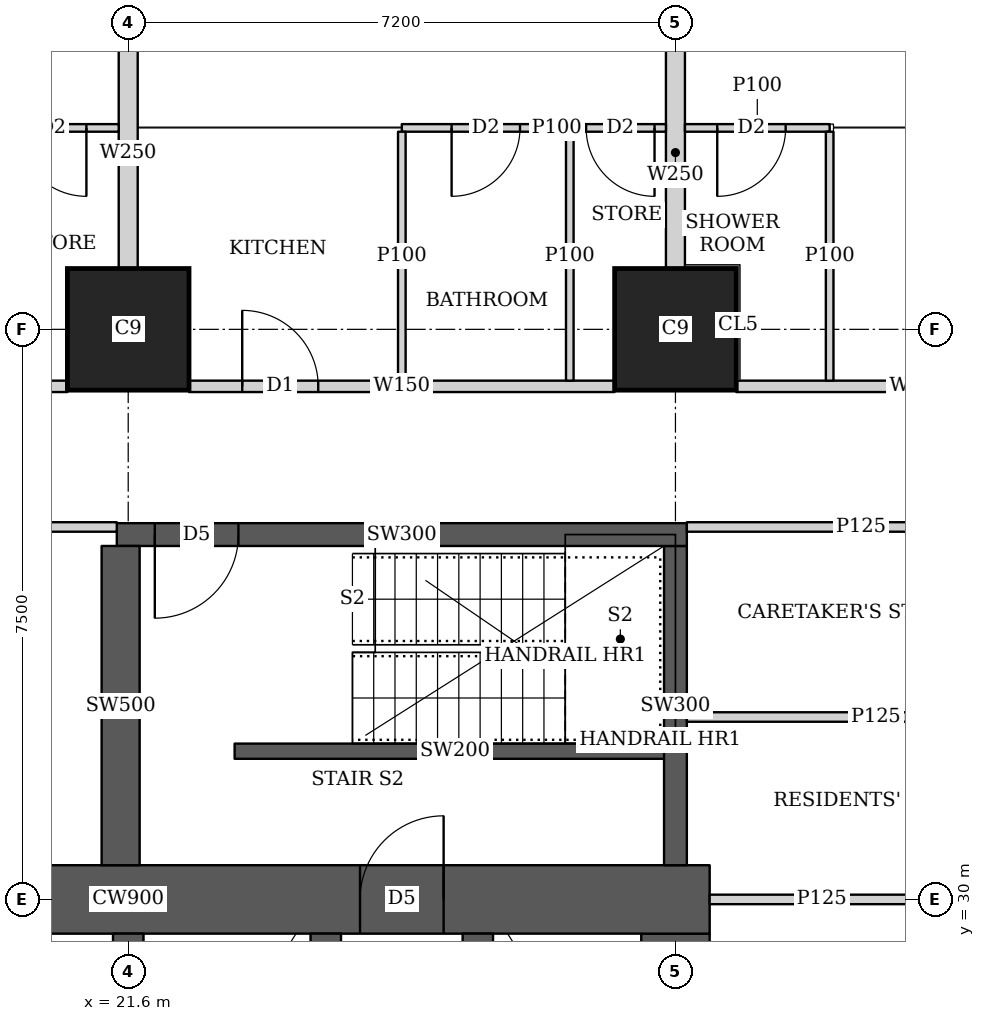
"""IFC4 building model, lengths in metres.
Left out: names, types, materials, properties, quantities, classifications, styles, units other than length and angle.
Written with IfcOpenShell. Run it as: python <this file> out.ifc"""

import sys

from ifc_helpers import new_model, si_unit, direction, frame, frame_2d, origin, origin_2d, place, context, subcontext, project, spatial, rectangle, extrude, element, fill, save


model = new_model("IFC4")
c1 = context("Model", 3, precision=1e-05, world=origin(), true_north=direction((0.0, 1.0)))
c2 = subcontext(c1, "Body", "Model", "MODEL_VIEW")
j1 = project(units=[si_unit("LENGTHUNIT", "METRE"), si_unit("PLANEANGLEUNIT", "RADIAN")], contexts=[c1])
p1 = place(None, origin())
s1 = spatial("IfcSite", under=j1, at=p1, CompositionType="ELEMENT")
p2 = place(p1, origin())
s2 = spatial("IfcBuilding", under=s1, at=p2, CompositionType="ELEMENT")
p3 = place(p2, frame((0.0, 0.0, 126.65)))
s3 = spatial("IfcBuildingStorey", under=s2, at=p3, CompositionType="ELEMENT", Elevation=126.65)
for number, where, z_axis, x_axis in (
    (1, (21.6, 37.5, 0.0), (0.0, 0.0, 1.0), (1.0, 0.0, 0.0)),
    (2, (28.8, 37.5, 0.0), (0.0, 0.0, 1.0), (1.0, 0.0, 0.0)),
):
    element("IfcColumn", number, at=place(p3, frame(where, z_axis=z_axis, x_axis=x_axis)), inside=s3, PredefinedType="COLUMN", context=c2, shape_type="SweptSolid", body=[
        extrude(rectangle(XDim=1.6, YDim=1.6, at=origin_2d()), origin(), (0.0, 0.0, 1.0), 3.75),
    ])
p4 = place(p3, frame((13.95, 30.0, 0.0), z_axis=(0.0, 0.0, 1.0), x_axis=(1.0, 0.0, 0.0)))
e3 = element("IfcWall", 3, at=p4, inside=s3, PredefinedType="SHEAR", context=c2, shape_type="SweptSolid", body=[
    extrude(rectangle(XDim=15.3, YDim=0.9, at=frame_2d((7.65, 0.0))), origin(), (0.0, 0.0, 1.0), 3.75),
])
p5 = place(p4, frame((4.45, 0.0, 0.0)))
e4 = element("IfcOpeningElement", 4, at=p5, cuts=e3, PredefinedType="OPENING", context=c2, shape_type="SweptSolid", body=[
    extrude(rectangle(XDim=1.8, YDim=2.1, at=frame_2d((0.9, 1.05))), frame((0.0, 0.46, 0.0), z_axis=(0.0, -1.0, 0.0), x_axis=(1.0, 0.0, 0.0)), (0.0, 0.0, 1.0), 0.92),
])
p6 = place(p4, frame((10.7, 0.0, 0.0)))
e5 = element("IfcOpeningElement", 5, at=p6, cuts=e3, PredefinedType="OPENING", context=c2, shape_type="SweptSolid", body=[
    extrude(rectangle(XDim=1.1, YDim=2.1, at=frame_2d((0.55, 1.05))), frame((0.0, 0.46, 0.0), z_axis=(0.0, -1.0, 0.0), x_axis=(1.0, 0.0, 0.0)), (0.0, 0.0, 1.0), 0.92),
])
p7 = place(p3, frame((28.8, 15.45, 0.0), z_axis=(0.0, 0.0, 1.0), x_axis=(0.0, 1.0, 0.0)))
e6 = element("IfcWall", 6, at=p7, inside=s3, PredefinedType="SHEAR", context=c2, shape_type="SweptSolid", body=[
    extrude(rectangle(XDim=14.1, YDim=0.9, at=frame_2d((7.05, 0.0))), origin(), (0.0, 0.0, 1.0), 3.75),
])
for number, where, z_axis, x_axis in (
    (7, (21.6, 15.45, 0.0), (0.0, 0.0, 1.0), (0.0, 1.0, 0.0)),
    (8, (24.2, 15.45, 0.0), (0.0, 0.0, 1.0), (0.0, 1.0, 0.0)),
):
    element("IfcWall", number, at=place(p3, frame(where, z_axis=z_axis, x_axis=x_axis)), inside=s3, PredefinedType="SHEAR", context=c2, shape_type="SweptSolid", body=[
        extrude(rectangle(XDim=14.1, YDim=0.4, at=frame_2d((7.05, 0.0))), origin(), (0.0, 0.0, 1.0), 3.75),
    ])
p8 = place(p3, frame((26.2, 26.45, 0.0), z_axis=(0.0, 0.0, 1.0), x_axis=(0.0, 1.0, 0.0)))
e9 = element("IfcWall", 9, at=p8, inside=s3, PredefinedType="SHEAR", context=c2, shape_type="SweptSolid", body=[
    extrude(rectangle(XDim=3.1, YDim=0.4, at=frame_2d((1.55, 0.0))), origin(), (0.0, 0.0, 1.0), 3.75),
])
p9 = place(p8, frame((1.075, 0.0, 0.0)))
e10 = element("IfcOpeningElement", 10, at=p9, cuts=e9, PredefinedType="OPENING", context=c2, shape_type="SweptSolid", body=[
    extrude(rectangle(XDim=1.2, YDim=2.1, at=frame_2d((0.6, 1.05))), frame((0.0, 0.21, 0.0), z_axis=(0.0, -1.0, 0.0), x_axis=(1.0, 0.0, 0.0)), (0.0, 0.0, 1.0), 0.42),
])
p10 = place(p3, frame((21.45, 34.8, 0.0), z_axis=(0.0, 0.0, 1.0), x_axis=(1.0, 0.0, 0.0)))
e11 = element("IfcWall", 11, at=p10, inside=s3, PredefinedType="SHEAR", context=c2, shape_type="SweptSolid", body=[
    extrude(rectangle(XDim=7.5, YDim=0.3, at=frame_2d((3.75, 0.0))), origin(), (0.0, 0.0, 1.0), 3.75),
])
p11 = place(p10, frame((0.5, 0.0, 0.0)))
e12 = element("IfcOpeningElement", 12, at=p11, cuts=e11, PredefinedType="OPENING", context=c2, shape_type="SweptSolid", body=[
    extrude(rectangle(XDim=1.1, YDim=2.1, at=frame_2d((0.55, 1.05))), frame((0.0, 0.16, 0.0), z_axis=(0.0, -1.0, 0.0), x_axis=(1.0, 0.0, 0.0)), (0.0, 0.0, 1.0), 0.32),
])
p12 = place(p3, frame((21.5, 30.45, 0.0), z_axis=(0.0, 0.0, 1.0), x_axis=(0.0, 1.0, 0.0)))
e13 = element("IfcWall", 13, at=p12, inside=s3, PredefinedType="SHEAR", context=c2, shape_type="SweptSolid", body=[
    extrude(rectangle(XDim=4.2, YDim=0.5, at=frame_2d((2.1, 0.0))), origin(), (0.0, 0.0, 1.0), 3.75),
])
p13 = place(p3, frame((28.8, 30.45, 0.0), z_axis=(0.0, 0.0, 1.0), x_axis=(0.0, 1.0, 0.0)))
e14 = element("IfcWall", 14, at=p13, inside=s3, PredefinedType="SHEAR", context=c2, shape_type="SweptSolid", body=[
    extrude(rectangle(XDim=4.2, YDim=0.3, at=frame_2d((2.1, 0.0))), origin(), (0.0, 0.0, 1.0), 3.75),
])
p14 = place(p3, frame((15.201, 36.75, 0.0), z_axis=(0.0, 0.0, 1.0), x_axis=(1.0, 0.0, 0.0)))
e15 = element("IfcWall", 15, at=p14, inside=s3, PredefinedType="SOLIDWALL", context=c2, shape_type="SweptSolid", body=[
    extrude(rectangle(XDim=5.598, YDim=0.15, at=frame_2d((2.799, 0.0))), origin(), (0.0, 0.0, 1.0), 3.45),
])
p15 = place(p3, frame((22.401, 36.75, 0.0), z_axis=(0.0, 0.0, 1.0), x_axis=(1.0, 0.0, 0.0)))
e16 = element("IfcWall", 16, at=p15, inside=s3, PredefinedType="SOLIDWALL", context=c2, shape_type="SweptSolid", body=[
    extrude(rectangle(XDim=5.598, YDim=0.15, at=frame_2d((2.799, 0.0))), origin(), (0.0, 0.0, 1.0), 3.45),
])
p16 = place(p15, frame((0.699, 0.0, 0.0)))
e17 = element("IfcOpeningElement", 17, at=p16, cuts=e16, PredefinedType="OPENING", context=c2, shape_type="SweptSolid", body=[
    extrude(rectangle(XDim=1.0, YDim=2.1, at=frame_2d((0.5, 1.05))), frame((0.0, 0.085, 0.0), z_axis=(0.0, -1.0, 0.0), x_axis=(1.0, 0.0, 0.0)), (0.0, 0.0, 1.0), 0.17),
])
p17 = place(p3, frame((29.601, 36.75, 0.0), z_axis=(0.0, 0.0, 1.0), x_axis=(1.0, 0.0, 0.0)))
e18 = element("IfcWall", 18, at=p17, inside=s3, PredefinedType="SOLIDWALL", context=c2, shape_type="SweptSolid", body=[
    extrude(rectangle(XDim=5.372, YDim=0.15, at=frame_2d((2.686, 0.0))), origin(), (0.0, 0.0, 1.0), 3.45),
])
p18 = place(p17, frame((2.845, 0.0, 0.0)))
e19 = element("IfcOpeningElement", 19, at=p18, cuts=e18, PredefinedType="OPENING", context=c2, shape_type="SweptSolid", body=[
    extrude(rectangle(XDim=1.0, YDim=2.1, at=frame_2d((0.5, 1.05))), frame((0.0, 0.085, 0.0), z_axis=(0.0, -1.0, 0.0), x_axis=(1.0, 0.0, 0.0)), (0.0, 0.0, 1.0), 0.17),
])
p19 = place(p3, frame((14.4, 40.15, 0.0), z_axis=(0.0, 0.0, 1.0), x_axis=(1.0, 0.0, 0.0)))
e20 = element("IfcWall", 20, at=p19, inside=s3, PredefinedType="PARTITIONING", context=c2, shape_type="SweptSolid", body=[
    extrude(rectangle(XDim=7.075, YDim=0.1, at=frame_2d((3.538, 0.0))), origin(), (0.0, 0.0, 1.0), 3.45),
])
p20 = place(p19, frame((0.655, 0.0, 0.0)))
e21 = element("IfcOpeningElement", 21, at=p20, cuts=e20, PredefinedType="OPENING", context=c2, shape_type="SweptSolid", body=[
    extrude(rectangle(XDim=0.9, YDim=2.1, at=frame_2d((0.45, 1.05))), frame((0.0, 0.06, 0.0), z_axis=(0.0, -1.0, 0.0), x_axis=(1.0, 0.0, 0.0)), (0.0, 0.0, 1.0), 0.12),
])
p21 = place(p19, frame((3.95, 0.0, 0.0)))
e22 = element("IfcOpeningElement", 22, at=p21, cuts=e20, PredefinedType="OPENING", context=c2, shape_type="SweptSolid", body=[
    extrude(rectangle(XDim=0.9, YDim=2.1, at=frame_2d((0.45, 1.05))), frame((0.0, 0.06, 0.0), z_axis=(0.0, -1.0, 0.0), x_axis=(1.0, 0.0, 0.0)), (0.0, 0.0, 1.0), 0.12),
])
p22 = place(p19, frame((2.455, 0.0, 0.0)))
e23 = element("IfcOpeningElement", 23, at=p22, cuts=e20, PredefinedType="OPENING", context=c2, shape_type="SweptSolid", body=[
    extrude(rectangle(XDim=0.9, YDim=2.1, at=frame_2d((0.45, 1.05))), frame((0.0, 0.06, 0.0), z_axis=(0.0, -1.0, 0.0), x_axis=(1.0, 0.0, 0.0)), (0.0, 0.0, 1.0), 0.12),
])
p23 = place(p19, frame((5.75, 0.0, 0.0)))
e24 = element("IfcOpeningElement", 24, at=p23, cuts=e20, PredefinedType="OPENING", context=c2, shape_type="SweptSolid", body=[
    extrude(rectangle(XDim=0.9, YDim=2.1, at=frame_2d((0.45, 1.05))), frame((0.0, 0.06, 0.0), z_axis=(0.0, -1.0, 0.0), x_axis=(1.0, 0.0, 0.0)), (0.0, 0.0, 1.0), 0.12),
])
p24 = place(p3, frame((25.2, 40.15, 0.0), z_axis=(0.0, 0.0, 1.0), x_axis=(1.0, 0.0, 0.0)))
e25 = element("IfcWall", 25, at=p24, inside=s3, PredefinedType="PARTITIONING", context=c2, shape_type="SweptSolid", body=[
    extrude(rectangle(XDim=3.475, YDim=0.1, at=frame_2d((1.738, 0.0))), origin(), (0.0, 0.0, 1.0), 3.45),
])
p25 = place(p24, frame((0.655, 0.0, 0.0)))
e26 = element("IfcOpeningElement", 26, at=p25, cuts=e25, PredefinedType="OPENING", context=c2, shape_type="SweptSolid", body=[
    extrude(rectangle(XDim=0.9, YDim=2.1, at=frame_2d((0.45, 1.05))), frame((0.0, 0.06, 0.0), z_axis=(0.0, -1.0, 0.0), x_axis=(1.0, 0.0, 0.0)), (0.0, 0.0, 1.0), 0.12),
])
p26 = place(p24, frame((2.425, 0.0, 0.0)))
e27 = element("IfcOpeningElement", 27, at=p26, cuts=e25, PredefinedType="OPENING", context=c2, shape_type="SweptSolid", body=[
    extrude(rectangle(XDim=0.9, YDim=2.1, at=frame_2d((0.45, 1.05))), frame((0.0, 0.06, 0.0), z_axis=(0.0, -1.0, 0.0), x_axis=(1.0, 0.0, 0.0)), (0.0, 0.0, 1.0), 0.12),
])
for number, where, z_axis, x_axis in (
    (28, (25.2, 36.825, 0.0), (0.0, 0.0, 1.0), (0.0, 1.0, 0.0)),
    (29, (27.41, 36.825, 0.0), (0.0, 0.0, 1.0), (0.0, 1.0, 0.0)),
):
    element("IfcWall", number, at=place(p3, frame(where, z_axis=z_axis, x_axis=x_axis)), inside=s3, PredefinedType="PARTITIONING", context=c2, shape_type="SweptSolid", body=[
        extrude(rectangle(XDim=3.275, YDim=0.1, at=frame_2d((1.638, 0.0))), origin(), (0.0, 0.0, 1.0), 3.45),
    ])
p27 = place(p3, frame((21.6, 38.301, 0.0), z_axis=(0.0, 0.0, 1.0), x_axis=(0.0, 1.0, 0.0)))
e30 = element("IfcWall", 30, at=p27, inside=s3, PredefinedType="SOLIDWALL", context=c2, shape_type="SweptSolid", body=[
    extrude(rectangle(XDim=3.049, YDim=0.25, at=frame_2d((1.524, 0.0))), origin(), (0.0, 0.0, 1.0), 3.45),
])
p28 = place(p3, frame((28.925, 40.15, 0.0), z_axis=(0.0, 0.0, 1.0), x_axis=(1.0, 0.0, 0.0)))
e31 = element("IfcWall", 31, at=p28, inside=s3, PredefinedType="PARTITIONING", context=c2, shape_type="SweptSolid", body=[
    extrude(rectangle(XDim=1.904, YDim=0.1, at=frame_2d((0.952, 0.0))), origin(), (0.0, 0.0, 1.0), 3.45),
])
p29 = place(p28, frame((0.425, 0.0, 0.0)))
e32 = element("IfcOpeningElement", 32, at=p29, cuts=e31, PredefinedType="OPENING", context=c2, shape_type="SweptSolid", body=[
    extrude(rectangle(XDim=0.9, YDim=2.1, at=frame_2d((0.45, 1.05))), frame((0.0, 0.06, 0.0), z_axis=(0.0, -1.0, 0.0), x_axis=(1.0, 0.0, 0.0)), (0.0, 0.0, 1.0), 0.12),
])
p30 = place(p3, frame((30.829, 36.825, 0.0), z_axis=(0.0, 0.0, 1.0), x_axis=(0.0, 1.0, 0.0)))
e33 = element("IfcWall", 33, at=p30, inside=s3, PredefinedType="PARTITIONING", context=c2, shape_type="SweptSolid", body=[
    extrude(rectangle(XDim=3.275, YDim=0.1, at=frame_2d((1.638, 0.0))), origin(), (0.0, 0.0, 1.0), 3.45),
])
p31 = place(p3, frame((28.8, 38.301, 0.0), z_axis=(0.0, 0.0, 1.0), x_axis=(0.0, 1.0, 0.0)))
e34 = element("IfcWall", 34, at=p31, inside=s3, PredefinedType="SOLIDWALL", context=c2, shape_type="SweptSolid", body=[
    extrude(rectangle(XDim=3.049, YDim=0.25, at=frame_2d((1.524, 0.0))), origin(), (0.0, 0.0, 1.0), 3.45),
])
p32 = place(p3, frame((10.163, 34.9, 0.0), z_axis=(0.0, 0.0, 1.0), x_axis=(1.0, 0.0, 0.0)))
e35 = element("IfcWall", 35, at=p32, inside=s3, PredefinedType="PARTITIONING", context=c2, shape_type="SweptSolid", body=[
    extrude(rectangle(XDim=11.287, YDim=0.125, at=frame_2d((5.644, 0.0))), origin(), (0.0, 0.0, 1.0), 3.45),
])
p33 = place(p32, frame((7.737, 0.0, 0.0)))
e36 = element("IfcOpeningElement", 36, at=p33, cuts=e35, PredefinedType="OPENING", context=c2, shape_type="SweptSolid", body=[
    extrude(rectangle(XDim=1.8, YDim=2.1, at=frame_2d((0.9, 1.05))), frame((0.0, 0.073, 0.0), z_axis=(0.0, -1.0, 0.0), x_axis=(1.0, 0.0, 0.0)), (0.0, 0.0, 1.0), 0.145),
])
p34 = place(p3, frame((28.95, 34.9, 0.0), z_axis=(0.0, 0.0, 1.0), x_axis=(1.0, 0.0, 0.0)))
e37 = element("IfcWall", 37, at=p34, inside=s3, PredefinedType="PARTITIONING", context=c2, shape_type="SweptSolid", body=[
    extrude(rectangle(XDim=4.588, YDim=0.125, at=frame_2d((2.294, 0.0))), origin(), (0.0, 0.0, 1.0), 3.45),
])
p35 = place(p3, frame((29.25, 30.0, 0.0), z_axis=(0.0, 0.0, 1.0), x_axis=(1.0, 0.0, 0.0)))
e38 = element("IfcWall", 38, at=p35, inside=s3, PredefinedType="PARTITIONING", context=c2, shape_type="SweptSolid", body=[
    extrude(rectangle(XDim=2.949, YDim=0.125, at=frame_2d((1.475, 0.0))), origin(), (0.0, 0.0, 1.0), 3.45),
])
p36 = place(p3, frame((28.95, 32.4, 0.0), z_axis=(0.0, 0.0, 1.0), x_axis=(1.0, 0.0, 0.0)))
e39 = element("IfcWall", 39, at=p36, inside=s3, PredefinedType="PARTITIONING", context=c2, shape_type="SweptSolid", body=[
    extrude(rectangle(XDim=4.976, YDim=0.125, at=frame_2d((2.488, 0.0))), origin(), (0.0, 0.0, 1.0), 3.45),
])
p37 = place(p3, frame((23.0, 31.95, 0.0), z_axis=(0.0, 0.0, 1.0), x_axis=(1.0, 0.0, 0.0)))
e40 = element("IfcWall", 40, at=p37, inside=s3, PredefinedType="SHEAR", context=c2, shape_type="SweptSolid", body=[
    extrude(rectangle(XDim=5.8, YDim=0.2, at=frame_2d((2.9, 0.0))), origin(), (0.0, 0.0, 1.0), 3.75),
])
p38 = place(p23, origin())
e41 = element("IfcDoor", 41, at=p38, inside=s3, OperationType="SINGLE_SWING_LEFT", PredefinedType="DOOR", context=c2, shape_type="SweptSolid", body=[
    extrude(rectangle(XDim=0.9, YDim=2.1, at=frame_2d((0.45, 1.05))), frame((0.0, 0.025, 0.0), z_axis=(0.0, -1.0, 0.0), x_axis=(1.0, 0.0, 0.0)), (0.0, 0.0, 1.0), 0.05),
])
fill(e24, e41)
p39 = place(p25, origin())
e42 = element("IfcDoor", 42, at=p39, inside=s3, OperationType="SINGLE_SWING_RIGHT", PredefinedType="DOOR", context=c2, shape_type="SweptSolid", body=[
    extrude(rectangle(XDim=0.9, YDim=2.1, at=frame_2d((0.45, 1.05))), frame((0.0, 0.025, 0.0), z_axis=(0.0, -1.0, 0.0), x_axis=(1.0, 0.0, 0.0)), (0.0, 0.0, 1.0), 0.05),
])
fill(e26, e42)
p40 = place(p26, origin())
e43 = element("IfcDoor", 43, at=p40, inside=s3, OperationType="SINGLE_SWING_LEFT", PredefinedType="DOOR", context=c2, shape_type="SweptSolid", body=[
    extrude(rectangle(XDim=0.9, YDim=2.1, at=frame_2d((0.45, 1.05))), frame((0.0, 0.025, 0.0), z_axis=(0.0, -1.0, 0.0), x_axis=(1.0, 0.0, 0.0)), (0.0, 0.0, 1.0), 0.05),
])
fill(e27, e43)
p41 = place(p16, origin())
e44 = element("IfcDoor", 44, at=p41, inside=s3, OperationType="SINGLE_SWING_LEFT", PredefinedType="DOOR", context=c2, shape_type="SweptSolid", body=[
    extrude(rectangle(XDim=1.0, YDim=2.1, at=frame_2d((0.5, 1.05))), frame((0.0, 0.025, 0.0), z_axis=(0.0, -1.0, 0.0), x_axis=(1.0, 0.0, 0.0)), (0.0, 0.0, 1.0), 0.05),
])
fill(e17, e44)
p42 = place(p29, origin())
e45 = element("IfcDoor", 45, at=p42, inside=s3, OperationType="SINGLE_SWING_RIGHT", PredefinedType="DOOR", context=c2, shape_type="SweptSolid", body=[
    extrude(rectangle(XDim=0.9, YDim=2.1, at=frame_2d((0.45, 1.05))), frame((0.0, 0.025, 0.0), z_axis=(0.0, -1.0, 0.0), x_axis=(1.0, 0.0, 0.0)), (0.0, 0.0, 1.0), 0.05),
])
fill(e32, e45)
p43 = place(p6, origin())
e46 = element("IfcDoor", 46, at=p43, inside=s3, OperationType="SINGLE_SWING_RIGHT", PredefinedType="DOOR", context=c2, shape_type="SweptSolid", body=[
    extrude(rectangle(XDim=1.1, YDim=2.1, at=frame_2d((0.55, 1.05))), frame((0.0, 0.025, 0.0), z_axis=(0.0, -1.0, 0.0), x_axis=(1.0, 0.0, 0.0)), (0.0, 0.0, 1.0), 0.05),
])
fill(e5, e46)
p44 = place(p11, origin())
e47 = element("IfcDoor", 47, at=p44, inside=s3, OperationType="SINGLE_SWING_RIGHT", PredefinedType="DOOR", context=c2, shape_type="SweptSolid", body=[
    extrude(rectangle(XDim=1.1, YDim=2.1, at=frame_2d((0.55, 1.05))), frame((0.0, 0.025, 0.0), z_axis=(0.0, -1.0, 0.0), x_axis=(1.0, 0.0, 0.0)), (0.0, 0.0, 1.0), 0.05),
])
fill(e12, e47)
save(model, sys.argv[1])
